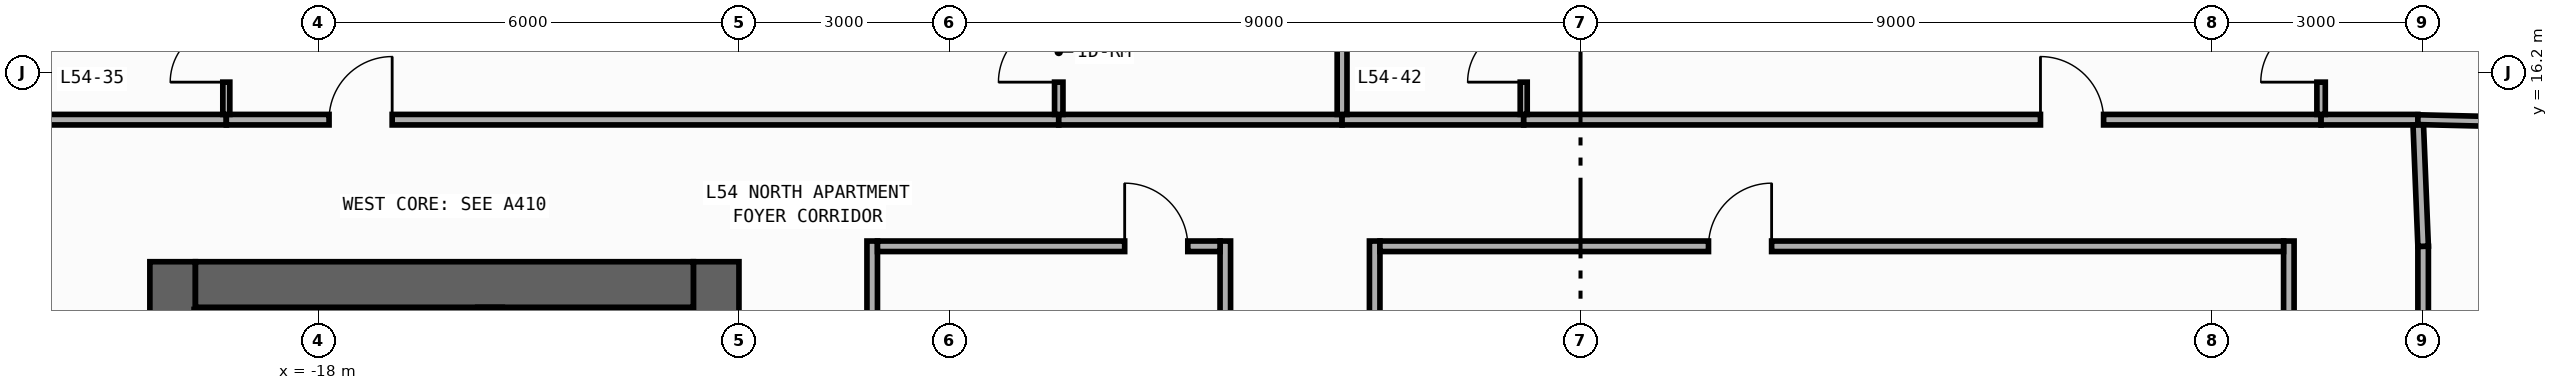
"""IFC4 building model, lengths in metres.
Left out: names, types, materials, properties, quantities, classifications, styles, units other than length and angle.
Written with IfcOpenShell. Run it as: python <this file> out.ifc"""

import sys

from ifc_helpers import new_model, si_unit, direction, frame, frame_2d, origin, place, context, subcontext, project, spatial, rectangle, extrude, element, fill, save


model = new_model("IFC4")
c1 = context("Model", 3, precision=1e-05, world=origin(), true_north=direction((0.0, 1.0)))
c2 = subcontext(c1, "Body", "Model", "MODEL_VIEW")
j1 = project(units=[si_unit("LENGTHUNIT", "METRE"), si_unit("PLANEANGLEUNIT", "RADIAN")], contexts=[c1])
p1 = place(None, origin())
s1 = spatial("IfcSite", under=j1, at=p1, CompositionType="ELEMENT")
p2 = place(p1, origin())
s2 = spatial("IfcBuilding", under=s1, at=p2, CompositionType="ELEMENT")
p3 = place(p2, frame((0.0, 0.0, 233.2)))
s3 = spatial("IfcBuildingStorey", under=s2, at=p3, CompositionType="ELEMENT", Elevation=233.2)
p4 = place(p3, frame((-20.075, -13.5, 0.0), z_axis=(0.0, 0.0, 1.0), x_axis=(0.0, 1.0, 0.0)))
e1 = element("IfcWall", 1, at=p4, inside=s3, PredefinedType="SHEAR", context=c2, shape_type="SweptSolid", body=[
    extrude(rectangle(XDim=27.0, YDim=0.65, at=frame_2d((13.5, 0.0))), origin(), (0.0, 0.0, 1.0), 3.34),
])
p5 = place(p3, frame((-12.325, -13.5, 0.0), z_axis=(0.0, 0.0, 1.0), x_axis=(0.0, 1.0, 0.0)))
e2 = element("IfcWall", 2, at=p5, inside=s3, PredefinedType="SHEAR", context=c2, shape_type="SweptSolid", body=[
    extrude(rectangle(XDim=27.0, YDim=0.65, at=frame_2d((13.5, 0.0))), origin(), (0.0, 0.0, 1.0), 3.34),
])
p6 = place(p5, frame((15.175, 0.0, 0.0)))
e3 = element("IfcOpeningElement", 3, at=p6, cuts=e2, PredefinedType="OPENING", context=c2, shape_type="SweptSolid", body=[
    extrude(rectangle(XDim=0.85, YDim=2.1, at=frame_2d((0.425, 1.05))), frame((0.0, 0.335, 0.0), z_axis=(0.0, -1.0, 0.0), x_axis=(1.0, 0.0, 0.0)), (0.0, 0.0, 1.0), 0.67),
])
p7 = place(p5, frame((21.275, 0.0, 0.0)))
e4 = element("IfcOpeningElement", 4, at=p7, cuts=e2, PredefinedType="OPENING", context=c2, shape_type="SweptSolid", body=[
    extrude(rectangle(XDim=0.85, YDim=2.1, at=frame_2d((0.425, 1.05))), frame((0.0, 0.335, 0.0), z_axis=(0.0, -1.0, 0.0), x_axis=(1.0, 0.0, 0.0)), (0.0, 0.0, 1.0), 0.67),
])
p8 = place(p5, frame((4.275, 0.0, 0.0)))
e5 = element("IfcOpeningElement", 5, at=p8, cuts=e2, PredefinedType="OPENING", context=c2, shape_type="SweptSolid", body=[
    extrude(rectangle(XDim=0.85, YDim=2.1, at=frame_2d((0.425, 1.05))), frame((0.0, 0.335, 0.0), z_axis=(0.0, -1.0, 0.0), x_axis=(1.0, 0.0, 0.0)), (0.0, 0.0, 1.0), 0.67),
])
p9 = place(p5, frame((10.275, 0.0, 0.0)))
e6 = element("IfcOpeningElement", 6, at=p9, cuts=e2, PredefinedType="OPENING", context=c2, shape_type="SweptSolid", body=[
    extrude(rectangle(XDim=0.85, YDim=2.1, at=frame_2d((0.425, 1.05))), frame((0.0, 0.335, 0.0), z_axis=(0.0, -1.0, 0.0), x_axis=(1.0, 0.0, 0.0)), (0.0, 0.0, 1.0), 0.67),
])
p10 = place(p5, frame((12.725, 0.0, 0.0)))
e7 = element("IfcOpeningElement", 7, at=p10, cuts=e2, PredefinedType="OPENING", context=c2, shape_type="SweptSolid", body=[
    extrude(rectangle(XDim=1.15, YDim=2.2, at=frame_2d((0.575, 1.1))), frame((0.0, 0.335, 0.0), z_axis=(0.0, -1.0, 0.0), x_axis=(1.0, 0.0, 0.0)), (0.0, 0.0, 1.0), 0.67),
])
p11 = place(p5, frame((1.625, 0.0, 0.0)))
e8 = element("IfcOpeningElement", 8, at=p11, cuts=e2, PredefinedType="OPENING", context=c2, shape_type="SweptSolid", body=[
    extrude(rectangle(XDim=0.85, YDim=2.1, at=frame_2d((0.425, 1.05))), frame((0.0, 0.335, 0.0), z_axis=(0.0, -1.0, 0.0), x_axis=(1.0, 0.0, 0.0)), (0.0, 0.0, 1.0), 0.67),
])
p12 = place(p3, frame((-19.75, 13.175, 0.0), z_axis=(0.0, 0.0, 1.0), x_axis=(1.0, 0.0, 0.0)))
e9 = element("IfcWall", 9, at=p12, inside=s3, PredefinedType="SHEAR", context=c2, shape_type="SweptSolid", body=[
    extrude(rectangle(XDim=7.1, YDim=0.65, at=frame_2d((3.55, 0.0))), origin(), (0.0, 0.0, 1.0), 3.34),
])
p13 = place(p3, frame((-15.55, -12.85, 0.0), z_axis=(0.0, 0.0, 1.0), x_axis=(0.0, 1.0, 0.0)))
e10 = element("IfcWall", 10, at=p13, inside=s3, PredefinedType="SHEAR", context=c2, shape_type="SweptSolid", body=[
    extrude(rectangle(XDim=25.7, YDim=0.35, at=frame_2d((12.85, 0.0))), origin(), (0.0, 0.0, 1.0), 3.34),
])
p14 = place(p13, frame((12.075, 0.0, 0.0)))
e11 = element("IfcOpeningElement", 11, at=p14, cuts=e10, PredefinedType="OPENING", context=c2, shape_type="SweptSolid", body=[
    extrude(rectangle(XDim=1.15, YDim=2.2, at=frame_2d((0.575, 1.1))), frame((0.0, 0.185, 0.0), z_axis=(0.0, -1.0, 0.0), x_axis=(1.0, 0.0, 0.0)), (0.0, 0.0, 1.0), 0.37),
])
p15 = place(p13, frame((0.975, 0.0, 0.0)))
e12 = element("IfcOpeningElement", 12, at=p15, cuts=e10, PredefinedType="OPENING", context=c2, shape_type="SweptSolid", body=[
    extrude(rectangle(XDim=0.85, YDim=2.1, at=frame_2d((0.425, 1.05))), frame((0.0, 0.185, 0.0), z_axis=(0.0, -1.0, 0.0), x_axis=(1.0, 0.0, 0.0)), (0.0, 0.0, 1.0), 0.37),
])
p16 = place(p3, frame((-19.77, 12.71, 0.0), z_axis=(0.0, 0.0, 1.0), x_axis=(1.0, 0.0, 0.0)))
e13 = element("IfcWall", 13, at=p16, inside=s3, PredefinedType="SHEAR", context=c2, shape_type="SweptSolid", body=[
    extrude(rectangle(XDim=4.065, YDim=0.22, at=frame_2d((2.032, 0.0))), origin(), (0.0, 0.0, 1.0), 3.34),
])
p17 = place(p3, frame((-10.1, -2.81, 0.0), z_axis=(0.0, 0.0, 1.0), x_axis=(0.0, 1.0, 0.0)))
e14 = element("IfcWall", 14, at=p17, inside=s3, PredefinedType="PARTITIONING", context=c2, shape_type="SweptSolid", body=[
    extrude(rectangle(XDim=16.605, YDim=0.15, at=frame_2d((8.302, 0.0))), origin(), (0.0, 0.0, 1.0), 3.34),
])
p18 = place(p17, frame((7.751, 0.0, 0.0)))
e15 = element("IfcOpeningElement", 15, at=p18, cuts=e14, PredefinedType="OPENING", context=c2, shape_type="SweptSolid", body=[
    extrude(rectangle(XDim=0.9, YDim=2.15, at=frame_2d((0.45, 1.075))), frame((0.0, 0.085, 0.0), z_axis=(0.0, -1.0, 0.0), x_axis=(1.0, 0.0, 0.0)), (0.0, 0.0, 1.0), 0.17),
])
p19 = place(p3, frame((12.015, 7.2, 0.0), z_axis=(0.0, 0.0, 1.0), x_axis=(0.0, 1.0, 0.0)))
e16 = element("IfcWall", 16, at=p19, inside=s3, PredefinedType="PARTITIONING", context=c2, shape_type="SweptSolid", body=[
    extrude(rectangle(XDim=6.52, YDim=0.15, at=frame_2d((3.26, 0.0))), origin(), (0.0, 0.0, 1.0), 3.34),
])
p20 = place(p19, frame((0.67, 0.0, 0.0)))
e17 = element("IfcOpeningElement", 17, at=p20, cuts=e16, PredefinedType="OPENING", context=c2, shape_type="SweptSolid", body=[
    extrude(rectangle(XDim=0.9, YDim=2.15, at=frame_2d((0.45, 1.075))), frame((0.0, 0.085, 0.0), z_axis=(0.0, -1.0, 0.0), x_axis=(1.0, 0.0, 0.0)), (0.0, 0.0, 1.0), 0.17),
])
p21 = place(p3, frame((10.1, -2.81, 0.0), z_axis=(0.0, 0.0, 1.0), x_axis=(0.0, 1.0, 0.0)))
e18 = element("IfcWall", 18, at=p21, inside=s3, PredefinedType="PARTITIONING", context=c2, shape_type="SweptSolid", body=[
    extrude(rectangle(XDim=16.605, YDim=0.15, at=frame_2d((8.302, 0.0))), origin(), (0.0, 0.0, 1.0), 3.34),
])
p22 = place(p21, frame((7.751, 0.0, 0.0)))
e19 = element("IfcOpeningElement", 19, at=p22, cuts=e18, PredefinedType="OPENING", context=c2, shape_type="SweptSolid", body=[
    extrude(rectangle(XDim=0.9, YDim=2.15, at=frame_2d((0.45, 1.075))), frame((0.0, 0.085, 0.0), z_axis=(0.0, -1.0, 0.0), x_axis=(1.0, 0.0, 0.0)), (0.0, 0.0, 1.0), 0.17),
])
p23 = place(p3, frame((-5.065, -2.66, 0.0), z_axis=(0.0, 0.0, 1.0), x_axis=(0.0, 1.0, 0.0)))
e20 = element("IfcWall", 20, at=p23, inside=s3, PredefinedType="PARTITIONING", context=c2, shape_type="SweptSolid", body=[
    extrude(rectangle(XDim=16.455, YDim=0.15, at=frame_2d((8.228, 0.0))), origin(), (0.0, 0.0, 1.0), 2.99),
])
p24 = place(p23, frame((7.677, 0.0, 0.0)))
e21 = element("IfcOpeningElement", 21, at=p24, cuts=e20, PredefinedType="OPENING", context=c2, shape_type="SweptSolid", body=[
    extrude(rectangle(XDim=0.9, YDim=2.15, at=frame_2d((0.45, 1.075))), frame((0.0, 0.085, 0.0), z_axis=(0.0, -1.0, 0.0), x_axis=(1.0, 0.0, 0.0)), (0.0, 0.0, 1.0), 0.17),
])
p25 = place(p3, frame((-2.935, -2.66, 0.0), z_axis=(0.0, 0.0, 1.0), x_axis=(0.0, 1.0, 0.0)))
e22 = element("IfcWall", 22, at=p25, inside=s3, PredefinedType="PARTITIONING", context=c2, shape_type="SweptSolid", body=[
    extrude(rectangle(XDim=16.455, YDim=0.15, at=frame_2d((8.228, 0.0))), origin(), (0.0, 0.0, 1.0), 3.34),
])
p26 = place(p25, frame((7.677, 0.0, 0.0)))
e23 = element("IfcOpeningElement", 23, at=p26, cuts=e22, PredefinedType="OPENING", context=c2, shape_type="SweptSolid", body=[
    extrude(rectangle(XDim=0.9, YDim=2.15, at=frame_2d((0.45, 1.075))), frame((0.0, 0.085, 0.0), z_axis=(0.0, -1.0, 0.0), x_axis=(1.0, 0.0, 0.0)), (0.0, 0.0, 1.0), 0.17),
])
p27 = place(p3, frame((-21.955, 15.525, 0.0), z_axis=(0.0, 0.0, 1.0), x_axis=(1.0, 0.0, 0.0)))
e24 = element("IfcWall", 24, at=p27, inside=s3, PredefinedType="PARTITIONING", context=c2, shape_type="SweptSolid", body=[
    extrude(rectangle(XDim=2.645, YDim=0.15, at=frame_2d((1.323, 0.0))), origin(), (0.0, 0.0, 1.0), 3.34),
])
p28 = place(p3, frame((-19.31, 15.525, 0.0), z_axis=(0.0, 0.0, 1.0), x_axis=(1.0, 0.0, 0.0)))
e25 = element("IfcWall", 25, at=p28, inside=s3, PredefinedType="PARTITIONING", context=c2, shape_type="SweptSolid", body=[
    extrude(rectangle(XDim=11.87, YDim=0.15, at=frame_2d((5.935, 0.0))), origin(), (0.0, 0.0, 1.0), 3.34),
])
p29 = place(p28, frame((1.465, 0.0, 0.0)))
e26 = element("IfcOpeningElement", 26, at=p29, cuts=e25, PredefinedType="OPENING", context=c2, shape_type="SweptSolid", body=[
    extrude(rectangle(XDim=0.9, YDim=2.15, at=frame_2d((0.45, 1.075))), frame((0.0, 0.085, 0.0), z_axis=(0.0, -1.0, 0.0), x_axis=(1.0, 0.0, 0.0)), (0.0, 0.0, 1.0), 0.17),
])
p30 = place(p3, frame((-7.44, 15.525, 0.0), z_axis=(0.0, 0.0, 1.0), x_axis=(1.0, 0.0, 0.0)))
e27 = element("IfcWall", 27, at=p30, inside=s3, PredefinedType="PARTITIONING", context=c2, shape_type="SweptSolid", body=[
    extrude(rectangle(XDim=4.04, YDim=0.15, at=frame_2d((2.02, 0.0))), origin(), (0.0, 0.0, 1.0), 3.34),
])
p31 = place(p3, frame((-3.4, 15.525, 0.0), z_axis=(0.0, 0.0, 1.0), x_axis=(1.0, 0.0, 0.0)))
e28 = element("IfcWall", 28, at=p31, inside=s3, PredefinedType="PARTITIONING", context=c2, shape_type="SweptSolid", body=[
    extrude(rectangle(XDim=2.59, YDim=0.15, at=frame_2d((1.295, 0.0))), origin(), (0.0, 0.0, 1.0), 3.34),
])
p32 = place(p3, frame((-0.81, 15.525, 0.0), z_axis=(0.0, 0.0, 1.0), x_axis=(1.0, 0.0, 0.0)))
e29 = element("IfcWall", 29, at=p32, inside=s3, PredefinedType="PARTITIONING", context=c2, shape_type="SweptSolid", body=[
    extrude(rectangle(XDim=11.37, YDim=0.15, at=frame_2d((5.685, 0.0))), origin(), (0.0, 0.0, 1.0), 3.34),
])
p33 = place(p32, frame((7.368, 0.0, 0.0)))
e30 = element("IfcOpeningElement", 30, at=p33, cuts=e29, PredefinedType="OPENING", context=c2, shape_type="SweptSolid", body=[
    extrude(rectangle(XDim=0.9, YDim=2.15, at=frame_2d((0.45, 1.075))), frame((0.0, 0.085, 0.0), z_axis=(0.0, -1.0, 0.0), x_axis=(1.0, 0.0, 0.0)), (0.0, 0.0, 1.0), 0.17),
])
p34 = place(p3, frame((10.56, 15.525, 0.0), z_axis=(0.0, 0.0, 1.0), x_axis=(1.0, 0.0, 0.0)))
e31 = element("IfcWall", 31, at=p34, inside=s3, PredefinedType="PARTITIONING", context=c2, shape_type="SweptSolid", body=[
    extrude(rectangle(XDim=1.38, YDim=0.15, at=frame_2d((0.69, 0.0))), origin(), (0.0, 0.0, 1.0), 3.34),
])
p35 = place(p3, frame((12.015, 13.72, 0.0), z_axis=(0.0, 0.0, 1.0), x_axis=(-0.040046877756, 0.99919780203, 0.0)))
e32 = element("IfcWall", 32, at=p35, inside=s3, PredefinedType="PARTITIONING", context=c2, shape_type="SweptSolid", body=[
    extrude(rectangle(XDim=1.731, YDim=0.15, at=frame_2d((0.866, 0.0))), origin(), (0.0, 0.0, 1.0), 3.34),
])
p36 = place(p3, frame((-10.025, 13.72, 0.0), z_axis=(0.0, 0.0, 1.0), x_axis=(1.0, 0.0, 0.0)))
e33 = element("IfcWall", 33, at=p36, inside=s3, PredefinedType="PARTITIONING", context=c2, shape_type="SweptSolid", body=[
    extrude(rectangle(XDim=4.885, YDim=0.15, at=frame_2d((2.442, 0.0))), origin(), (0.0, 0.0, 1.0), 3.34),
])
p37 = place(p36, frame((3.525, 0.0, 0.0)))
e34 = element("IfcOpeningElement", 34, at=p37, cuts=e33, PredefinedType="OPENING", context=c2, shape_type="SweptSolid", body=[
    extrude(rectangle(XDim=0.9, YDim=2.15, at=frame_2d((0.45, 1.075))), frame((0.0, 0.085, 0.0), z_axis=(0.0, -1.0, 0.0), x_axis=(1.0, 0.0, 0.0)), (0.0, 0.0, 1.0), 0.17),
])
p38 = place(p3, frame((-2.86, 13.72, 0.0), z_axis=(0.0, 0.0, 1.0), x_axis=(1.0, 0.0, 0.0)))
e35 = element("IfcWall", 35, at=p38, inside=s3, PredefinedType="PARTITIONING", context=c2, shape_type="SweptSolid", body=[
    extrude(rectangle(XDim=12.885, YDim=0.15, at=frame_2d((6.442, 0.0))), origin(), (0.0, 0.0, 1.0), 3.34),
])
p39 = place(p38, frame((4.685, 0.0, 0.0)))
e36 = element("IfcOpeningElement", 36, at=p39, cuts=e35, PredefinedType="OPENING", context=c2, shape_type="SweptSolid", body=[
    extrude(rectangle(XDim=0.9, YDim=2.15, at=frame_2d((0.45, 1.075))), frame((0.0, 0.085, 0.0), z_axis=(0.0, -1.0, 0.0), x_axis=(1.0, 0.0, 0.0)), (0.0, 0.0, 1.0), 0.17),
])
p40 = place(p3, frame((-19.31, 15.6, 0.0), z_axis=(0.0, 0.0, 1.0), x_axis=(0.0, 1.0, 0.0)))
e37 = element("IfcWall", 37, at=p40, inside=s3, PredefinedType="PARTITIONING", context=c2, shape_type="SweptSolid", body=[
    extrude(rectangle(XDim=2.5, YDim=0.1, at=frame_2d((1.25, 0.0))), origin(), (0.0, 0.0, 1.0), 3.34),
])
p41 = place(p40, frame((0.46, 0.0, 0.0)))
e38 = element("IfcOpeningElement", 38, at=p41, cuts=e37, PredefinedType="OPENING", context=c2, shape_type="SweptSolid", body=[
    extrude(rectangle(XDim=0.8, YDim=2.1, at=frame_2d((0.4, 1.05))), frame((0.0, 0.06, 0.0), z_axis=(0.0, -1.0, 0.0), x_axis=(1.0, 0.0, 0.0)), (0.0, 0.0, 1.0), 0.12),
])
p42 = place(p3, frame((-7.44, 15.6, 0.0), z_axis=(0.0, 0.0, 1.0), x_axis=(0.0, 1.0, 0.0)))
e39 = element("IfcWall", 39, at=p42, inside=s3, PredefinedType="PARTITIONING", context=c2, shape_type="SweptSolid", body=[
    extrude(rectangle(XDim=4.5, YDim=0.12, at=frame_2d((2.25, 0.0))), origin(), (0.0, 0.0, 1.0), 3.34),
])
p43 = place(p42, frame((0.46, 0.0, 0.0)))
e40 = element("IfcOpeningElement", 40, at=p43, cuts=e39, PredefinedType="OPENING", context=c2, shape_type="SweptSolid", body=[
    extrude(rectangle(XDim=0.86, YDim=2.15, at=frame_2d((0.43, 1.075))), frame((0.0, 0.07, 0.0), z_axis=(0.0, -1.0, 0.0), x_axis=(1.0, 0.0, 0.0)), (0.0, 0.0, 1.0), 0.14),
])
p44 = place(p3, frame((-3.4, 15.6, 0.0), z_axis=(0.0, 0.0, 1.0), x_axis=(0.0, 1.0, 0.0)))
e41 = element("IfcWall", 41, at=p44, inside=s3, PredefinedType="PARTITIONING", context=c2, shape_type="SweptSolid", body=[
    extrude(rectangle(XDim=2.5, YDim=0.14, at=frame_2d((1.25, 0.0))), origin(), (0.0, 0.0, 1.0), 3.34),
])
p45 = place(p3, frame((-0.81, 15.6, 0.0), z_axis=(0.0, 0.0, 1.0), x_axis=(0.0, 1.0, 0.0)))
e42 = element("IfcWall", 42, at=p45, inside=s3, PredefinedType="PARTITIONING", context=c2, shape_type="SweptSolid", body=[
    extrude(rectangle(XDim=2.5, YDim=0.1, at=frame_2d((1.25, 0.0))), origin(), (0.0, 0.0, 1.0), 3.34),
])
p46 = place(p45, frame((0.46, 0.0, 0.0)))
e43 = element("IfcOpeningElement", 43, at=p46, cuts=e42, PredefinedType="OPENING", context=c2, shape_type="SweptSolid", body=[
    extrude(rectangle(XDim=0.8, YDim=2.1, at=frame_2d((0.4, 1.05))), frame((0.0, 0.06, 0.0), z_axis=(0.0, -1.0, 0.0), x_axis=(1.0, 0.0, 0.0)), (0.0, 0.0, 1.0), 0.12),
])
p47 = place(p3, frame((10.56, 15.6, 0.0), z_axis=(0.0, 0.0, 1.0), x_axis=(0.0, 1.0, 0.0)))
e44 = element("IfcWall", 44, at=p47, inside=s3, PredefinedType="PARTITIONING", context=c2, shape_type="SweptSolid", body=[
    extrude(rectangle(XDim=4.5, YDim=0.12, at=frame_2d((2.25, 0.0))), origin(), (0.0, 0.0, 1.0), 3.34),
])
p48 = place(p47, frame((0.46, 0.0, 0.0)))
e45 = element("IfcOpeningElement", 45, at=p48, cuts=e44, PredefinedType="OPENING", context=c2, shape_type="SweptSolid", body=[
    extrude(rectangle(XDim=0.86, YDim=2.15, at=frame_2d((0.43, 1.075))), frame((0.0, 0.07, 0.0), z_axis=(0.0, -1.0, 0.0), x_axis=(1.0, 0.0, 0.0)), (0.0, 0.0, 1.0), 0.14),
])
p49 = place(p3, frame((11.94, 15.525, 0.0), z_axis=(0.0, 0.0, 1.0), x_axis=(0.999719241816, -0.023694673289, 0.0)))
e46 = element("IfcWall", 46, at=p49, inside=s3, PredefinedType="PARTITIONING", context=c2, shape_type="SweptSolid", body=[
    extrude(rectangle(XDim=2.741, YDim=0.14, at=frame_2d((1.37, 0.0))), origin(), (0.0, 0.0, 1.0), 3.34),
])
p50 = place(p29, origin())
e47 = element("IfcDoor", 47, at=p50, inside=s3, OperationType="SINGLE_SWING_RIGHT", PredefinedType="DOOR", context=c2, shape_type="SweptSolid", body=[
    extrude(rectangle(XDim=0.9, YDim=2.15, at=frame_2d((0.45, 1.075))), frame((0.0, 0.025, 0.0), z_axis=(0.0, -1.0, 0.0), x_axis=(1.0, 0.0, 0.0)), (0.0, 0.0, 1.0), 0.05),
])
fill(e26, e47)
p51 = place(p33, origin())
e48 = element("IfcDoor", 48, at=p51, inside=s3, OperationType="SINGLE_SWING_LEFT", PredefinedType="DOOR", context=c2, shape_type="SweptSolid", body=[
    extrude(rectangle(XDim=0.9, YDim=2.15, at=frame_2d((0.45, 1.075))), frame((0.0, 0.025, 0.0), z_axis=(0.0, -1.0, 0.0), x_axis=(1.0, 0.0, 0.0)), (0.0, 0.0, 1.0), 0.05),
])
fill(e30, e48)
p52 = place(p37, origin())
e49 = element("IfcDoor", 49, at=p52, inside=s3, OperationType="SINGLE_SWING_LEFT", PredefinedType="DOOR", context=c2, shape_type="SweptSolid", body=[
    extrude(rectangle(XDim=0.9, YDim=2.15, at=frame_2d((0.45, 1.075))), frame((0.0, 0.025, 0.0), z_axis=(0.0, -1.0, 0.0), x_axis=(1.0, 0.0, 0.0)), (0.0, 0.0, 1.0), 0.05),
])
fill(e34, e49)
p53 = place(p39, origin())
e50 = element("IfcDoor", 50, at=p53, inside=s3, OperationType="SINGLE_SWING_RIGHT", PredefinedType="DOOR", context=c2, shape_type="SweptSolid", body=[
    extrude(rectangle(XDim=0.9, YDim=2.15, at=frame_2d((0.45, 1.075))), frame((0.0, 0.025, 0.0), z_axis=(0.0, -1.0, 0.0), x_axis=(1.0, 0.0, 0.0)), (0.0, 0.0, 1.0), 0.05),
])
fill(e36, e50)
p54 = place(p41, origin())
e51 = element("IfcDoor", 51, at=p54, inside=s3, OperationType="SINGLE_SWING_LEFT", PredefinedType="DOOR", context=c2, shape_type="SweptSolid", body=[
    extrude(rectangle(XDim=0.8, YDim=2.1, at=frame_2d((0.4, 1.05))), frame((0.0, 0.025, 0.0), z_axis=(0.0, -1.0, 0.0), x_axis=(1.0, 0.0, 0.0)), (0.0, 0.0, 1.0), 0.05),
])
fill(e38, e51)
p55 = place(p43, origin())
e52 = element("IfcDoor", 52, at=p55, inside=s3, OperationType="SINGLE_SWING_LEFT", PredefinedType="DOOR", context=c2, shape_type="SweptSolid", body=[
    extrude(rectangle(XDim=0.86, YDim=2.15, at=frame_2d((0.43, 1.075))), frame((0.0, 0.025, 0.0), z_axis=(0.0, -1.0, 0.0), x_axis=(1.0, 0.0, 0.0)), (0.0, 0.0, 1.0), 0.05),
])
fill(e40, e52)
p56 = place(p46, origin())
e53 = element("IfcDoor", 53, at=p56, inside=s3, OperationType="SINGLE_SWING_LEFT", PredefinedType="DOOR", context=c2, shape_type="SweptSolid", body=[
    extrude(rectangle(XDim=0.8, YDim=2.1, at=frame_2d((0.4, 1.05))), frame((0.0, 0.025, 0.0), z_axis=(0.0, -1.0, 0.0), x_axis=(1.0, 0.0, 0.0)), (0.0, 0.0, 1.0), 0.05),
])
fill(e43, e53)
p57 = place(p48, origin())
e54 = element("IfcDoor", 54, at=p57, inside=s3, OperationType="SINGLE_SWING_LEFT", PredefinedType="DOOR", context=c2, shape_type="SweptSolid", body=[
    extrude(rectangle(XDim=0.86, YDim=2.15, at=frame_2d((0.43, 1.075))), frame((0.0, 0.025, 0.0), z_axis=(0.0, -1.0, 0.0), x_axis=(1.0, 0.0, 0.0)), (0.0, 0.0, 1.0), 0.05),
])
fill(e45, e54)
save(model, sys.argv[1])
